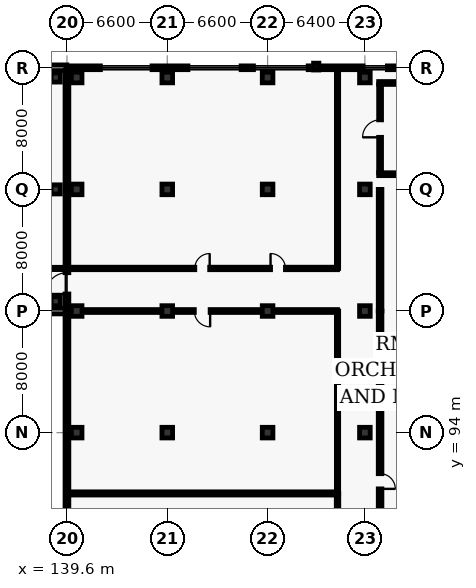
"""IFC4 building model, lengths in metres.
Left out: names, types, materials, properties, quantities, classifications, styles, units other than length and angle.
Written with IfcOpenShell. Run it as: python <this file> out.ifc"""

import sys

from ifc_helpers import new_model, si_unit, direction, frame, frame_2d, origin, origin_2d, place, context, subcontext, project, spatial, rectangle, extrude, element, fill, save


model = new_model("IFC4")
c1 = context("Model", 3, precision=1e-05, world=origin(), true_north=direction((0.0, 1.0)))
c2 = subcontext(c1, "Body", "Model", "MODEL_VIEW")
j1 = project(units=[si_unit("LENGTHUNIT", "METRE"), si_unit("PLANEANGLEUNIT", "RADIAN")], contexts=[c1])
p1 = place(None, origin())
s1 = spatial("IfcSite", under=j1, at=p1, CompositionType="ELEMENT")
p2 = place(p1, origin())
s2 = spatial("IfcBuilding", under=s1, at=p2, CompositionType="ELEMENT")
p3 = place(p2, frame((0.0, 0.0, 10.2)))
s3 = spatial("IfcBuildingStorey", under=s2, at=p3, CompositionType="ELEMENT", Elevation=10.2)
for number, where, z_axis, x_axis in (
    (1, (138.86, 102.64, 0.0), (0.0, 0.0, 1.0), (1.0, 0.0, 0.0)),
    (2, (138.86, 110.0, 0.0), (0.0, 0.0, 1.0), (1.0, 0.0, 0.0)),
    (3, (138.86, 117.36, 0.0), (0.0, 0.0, 1.0), (1.0, 0.0, 0.0)),
):
    element("IfcColumn", number, at=place(p3, frame(where, z_axis=z_axis, x_axis=x_axis)), inside=s3, PredefinedType="COLUMN", context=c2, shape_type="SweptSolid", body=[
        extrude(rectangle(XDim=0.6, YDim=0.6, at=origin_2d()), origin(), (0.0, 0.0, 1.0), 5.4),
    ])
for number, where, z_axis, x_axis in (
    (4, (140.24, 94.0, 0.0), (0.0, 0.0, 1.0), (1.0, 0.0, 0.0)),
    (5, (140.24, 102.0, 0.0), (0.0, 0.0, 1.0), (1.0, 0.0, 0.0)),
    (6, (140.24, 110.0, 0.0), (0.0, 0.0, 1.0), (1.0, 0.0, 0.0)),
    (7, (140.24, 117.36, 0.0), (0.0, 0.0, 1.0), (1.0, 0.0, 0.0)),
    (8, (146.2, 94.0, 0.0), (0.0, 0.0, 1.0), (1.0, 0.0, 0.0)),
    (9, (146.2, 102.0, 0.0), (0.0, 0.0, 1.0), (1.0, 0.0, 0.0)),
    (10, (146.2, 110.0, 0.0), (0.0, 0.0, 1.0), (1.0, 0.0, 0.0)),
    (11, (146.2, 117.36, 0.0), (0.0, 0.0, 1.0), (1.0, 0.0, 0.0)),
    (12, (152.8, 94.0, 0.0), (0.0, 0.0, 1.0), (1.0, 0.0, 0.0)),
    (13, (152.8, 102.0, 0.0), (0.0, 0.0, 1.0), (1.0, 0.0, 0.0)),
    (14, (152.8, 110.0, 0.0), (0.0, 0.0, 1.0), (1.0, 0.0, 0.0)),
    (15, (152.8, 117.36, 0.0), (0.0, 0.0, 1.0), (1.0, 0.0, 0.0)),
    (16, (159.2, 94.0, 0.0), (0.0, 0.0, 1.0), (1.0, 0.0, 0.0)),
    (17, (159.2, 102.0, 0.0), (0.0, 0.0, 1.0), (1.0, 0.0, 0.0)),
    (18, (159.2, 110.0, 0.0), (0.0, 0.0, 1.0), (1.0, 0.0, 0.0)),
    (19, (159.2, 117.36, 0.0), (0.0, 0.0, 1.0), (1.0, 0.0, 0.0)),
):
    element("IfcColumn", number, at=place(p3, frame(where, z_axis=z_axis, x_axis=x_axis)), inside=s3, PredefinedType="COLUMN", context=c2, shape_type="SweptSolid", body=[
        extrude(rectangle(XDim=0.7, YDim=0.7, at=origin_2d()), origin(), (0.0, 0.0, 1.0), 5.4),
    ])
p4 = place(p3, frame((156.0, 118.08, 0.0), z_axis=(0.0, 0.0, 1.0), x_axis=(0.0, 1.0, 0.0)))
e20 = element("IfcColumn", 20, at=p4, inside=s3, PredefinedType="PILASTER", context=c2, shape_type="SweptSolid", body=[
    extrude(rectangle(XDim=0.35, YDim=0.45, at=origin_2d()), origin(), (0.0, 0.0, 1.0), 5.4),
])
p5 = place(p3, frame((94.8, 118.0, 0.0), z_axis=(0.0, 0.0, 1.0), x_axis=(1.0, 0.0, 0.0)))
e21 = element("IfcWall", 21, at=p5, inside=s3, PredefinedType="SOLIDWALL", context=c2, shape_type="SweptSolid", body=[
    extrude(rectangle(XDim=44.795, YDim=0.38, at=frame_2d((22.397, 0.0))), origin(), (0.0, 0.0, 1.0), 5.16),
])
p6 = place(p5, frame((1.45, 0.0, 0.9)))
e22 = element("IfcOpeningElement", 22, at=p6, cuts=e21, PredefinedType="OPENING", context=c2, shape_type="SweptSolid", body=[
    extrude(rectangle(XDim=1.6, YDim=1.65, at=frame_2d((0.8, 0.825))), frame((0.0, 0.2, 0.0), z_axis=(0.0, -1.0, 0.0), x_axis=(1.0, 0.0, 0.0)), (0.0, 0.0, 1.0), 0.4),
])
p7 = place(p5, frame((8.3, 0.0, 0.9)))
e23 = element("IfcOpeningElement", 23, at=p7, cuts=e21, PredefinedType="OPENING", context=c2, shape_type="SweptSolid", body=[
    extrude(rectangle(XDim=3.1, YDim=2.45, at=frame_2d((1.55, 1.225))), frame((0.0, 0.2, 0.0), z_axis=(0.0, -1.0, 0.0), x_axis=(1.0, 0.0, 0.0)), (0.0, 0.0, 1.0), 0.4),
])
p8 = place(p5, frame((15.9, 0.0, 0.9)))
e24 = element("IfcOpeningElement", 24, at=p8, cuts=e21, PredefinedType="OPENING", context=c2, shape_type="SweptSolid", body=[
    extrude(rectangle(XDim=3.2, YDim=2.5, at=frame_2d((1.6, 1.25))), frame((0.0, 0.2, 0.0), z_axis=(0.0, -1.0, 0.0), x_axis=(1.0, 0.0, 0.0)), (0.0, 0.0, 1.0), 0.4),
])
p9 = place(p5, frame((22.75, 0.0, 0.9)))
e25 = element("IfcOpeningElement", 25, at=p9, cuts=e21, PredefinedType="OPENING", context=c2, shape_type="SweptSolid", body=[
    extrude(rectangle(XDim=3.3, YDim=2.5, at=frame_2d((1.65, 1.25))), frame((0.0, 0.2, 0.0), z_axis=(0.0, -1.0, 0.0), x_axis=(1.0, 0.0, 0.0)), (0.0, 0.0, 1.0), 0.4),
])
p10 = place(p5, frame((30.35, 0.0, 0.9)))
e26 = element("IfcOpeningElement", 26, at=p10, cuts=e21, PredefinedType="OPENING", context=c2, shape_type="SweptSolid", body=[
    extrude(rectangle(XDim=3.4, YDim=2.55, at=frame_2d((1.7, 1.275))), frame((0.0, 0.2, 0.0), z_axis=(0.0, -1.0, 0.0), x_axis=(1.0, 0.0, 0.0)), (0.0, 0.0, 1.0), 0.4),
])
p11 = place(p5, frame((36.45, 0.0, 0.9)))
e27 = element("IfcOpeningElement", 27, at=p11, cuts=e21, PredefinedType="OPENING", context=c2, shape_type="SweptSolid", body=[
    extrude(rectangle(XDim=3.5, YDim=2.55, at=frame_2d((1.75, 1.275))), frame((0.0, 0.2, 0.0), z_axis=(0.0, -1.0, 0.0), x_axis=(1.0, 0.0, 0.0)), (0.0, 0.0, 1.0), 0.4),
])
p12 = place(p3, frame((139.5, 102.0, 0.0), z_axis=(0.0, 0.0, 1.0), x_axis=(-1.0, 0.0, 0.0)))
e28 = element("IfcWall", 28, at=p12, inside=s3, PredefinedType="SOLIDWALL", context=c2, shape_type="SweptSolid", body=[
    extrude(rectangle(XDim=44.7, YDim=0.38, at=frame_2d((22.35, 0.0))), origin(), (0.0, 0.0, 1.0), 5.16),
])
p13 = place(p12, frame((2.2, 0.0, 0.9)))
e29 = element("IfcOpeningElement", 29, at=p13, cuts=e28, PredefinedType="OPENING", context=c2, shape_type="SweptSolid", body=[
    extrude(rectangle(XDim=3.6, YDim=2.6, at=frame_2d((1.8, 1.3))), frame((0.0, 0.2, 0.0), z_axis=(0.0, -1.0, 0.0), x_axis=(1.0, 0.0, 0.0)), (0.0, 0.0, 1.0), 0.4),
])
p14 = place(p12, frame((9.05, 0.0, 0.9)))
e30 = element("IfcOpeningElement", 30, at=p14, cuts=e28, PredefinedType="OPENING", context=c2, shape_type="SweptSolid", body=[
    extrude(rectangle(XDim=3.8, YDim=2.6, at=frame_2d((1.9, 1.3))), frame((0.0, 0.2, 0.0), z_axis=(0.0, -1.0, 0.0), x_axis=(1.0, 0.0, 0.0)), (0.0, 0.0, 1.0), 0.4),
])
p15 = place(p12, frame((15.9, 0.0, 0.9)))
e31 = element("IfcOpeningElement", 31, at=p15, cuts=e28, PredefinedType="OPENING", context=c2, shape_type="SweptSolid", body=[
    extrude(rectangle(XDim=1.6, YDim=1.65, at=frame_2d((0.8, 0.825))), frame((0.0, 0.2, 0.0), z_axis=(0.0, -1.0, 0.0), x_axis=(1.0, 0.0, 0.0)), (0.0, 0.0, 1.0), 0.4),
])
p16 = place(p12, frame((22.75, 0.0, 0.9)))
e32 = element("IfcOpeningElement", 32, at=p16, cuts=e28, PredefinedType="OPENING", context=c2, shape_type="SweptSolid", body=[
    extrude(rectangle(XDim=1.8, YDim=1.65, at=frame_2d((0.9, 0.825))), frame((0.0, 0.2, 0.0), z_axis=(0.0, -1.0, 0.0), x_axis=(1.0, 0.0, 0.0)), (0.0, 0.0, 1.0), 0.4),
])
p17 = place(p12, frame((29.6, 0.0, 0.9)))
e33 = element("IfcOpeningElement", 33, at=p17, cuts=e28, PredefinedType="OPENING", context=c2, shape_type="SweptSolid", body=[
    extrude(rectangle(XDim=2.0, YDim=1.7, at=frame_2d((1.0, 0.85))), frame((0.0, 0.2, 0.0), z_axis=(0.0, -1.0, 0.0), x_axis=(1.0, 0.0, 0.0)), (0.0, 0.0, 1.0), 0.4),
])
p18 = place(p12, frame((36.45, 0.0, 0.9)))
e34 = element("IfcOpeningElement", 34, at=p18, cuts=e28, PredefinedType="OPENING", context=c2, shape_type="SweptSolid", body=[
    extrude(rectangle(XDim=2.2, YDim=1.7, at=frame_2d((1.1, 0.85))), frame((0.0, 0.2, 0.0), z_axis=(0.0, -1.0, 0.0), x_axis=(1.0, 0.0, 0.0)), (0.0, 0.0, 1.0), 0.4),
])
p19 = place(p3, frame((139.6, 118.0, 0.0), z_axis=(0.0, 0.0, 1.0), x_axis=(1.0, 0.0, 0.0)))
e35 = element("IfcWall", 35, at=p19, inside=s3, PredefinedType="SOLIDWALL", context=c2, shape_type="SweptSolid", body=[
    extrude(rectangle(XDim=32.4, YDim=0.25, at=frame_2d((16.2, 0.0))), origin(), (0.0, 0.0, 1.0), 5.16),
])
p20 = place(p19, frame((2.2, 0.0, 0.9)))
e36 = element("IfcOpeningElement", 36, at=p20, cuts=e35, PredefinedType="OPENING", context=c2, shape_type="SweptSolid", body=[
    extrude(rectangle(XDim=3.4, YDim=2.55, at=frame_2d((1.7, 1.275))), frame((0.0, 0.135, 0.0), z_axis=(0.0, -1.0, 0.0), x_axis=(1.0, 0.0, 0.0)), (0.0, 0.0, 1.0), 0.27),
])
p21 = place(p19, frame((7.96, 0.0, 0.9)))
e37 = element("IfcOpeningElement", 37, at=p21, cuts=e35, PredefinedType="OPENING", context=c2, shape_type="SweptSolid", body=[
    extrude(rectangle(XDim=3.5, YDim=2.55, at=frame_2d((1.75, 1.275))), frame((0.0, 0.135, 0.0), z_axis=(0.0, -1.0, 0.0), x_axis=(1.0, 0.0, 0.0)), (0.0, 0.0, 1.0), 0.27),
])
p22 = place(p19, frame((12.27, 0.0, 0.9)))
e38 = element("IfcOpeningElement", 38, at=p22, cuts=e35, PredefinedType="OPENING", context=c2, shape_type="SweptSolid", body=[
    extrude(rectangle(XDim=3.6, YDim=2.6, at=frame_2d((1.8, 1.3))), frame((0.0, 0.135, 0.0), z_axis=(0.0, -1.0, 0.0), x_axis=(1.0, 0.0, 0.0)), (0.0, 0.0, 1.0), 0.27),
])
p23 = place(p19, frame((19.48, 0.0, 0.9)))
e39 = element("IfcOpeningElement", 39, at=p23, cuts=e35, PredefinedType="OPENING", context=c2, shape_type="SweptSolid", body=[
    extrude(rectangle(XDim=1.6, YDim=1.65, at=frame_2d((0.8, 0.825))), frame((0.0, 0.135, 0.0), z_axis=(0.0, -1.0, 0.0), x_axis=(1.0, 0.0, 0.0)), (0.0, 0.0, 1.0), 0.27),
])
p24 = place(p3, frame((139.6, 71.74, 0.0), z_axis=(0.0, 0.0, 1.0), x_axis=(0.0, 1.0, 0.0)))
e40 = element("IfcWall", 40, at=p24, inside=s3, PredefinedType="SOLIDWALL", context=c2, shape_type="SweptSolid", body=[
    extrude(rectangle(XDim=46.12, YDim=0.25, at=frame_2d((23.06, 0.0))), origin(), (0.0, 0.0, 1.0), 4.31),
])
p25 = place(p24, frame((31.38, 0.0, 0.0)))
e41 = element("IfcOpeningElement", 41, at=p25, cuts=e40, PredefinedType="OPENING", context=c2, shape_type="SweptSolid", body=[
    extrude(rectangle(XDim=1.4, YDim=2.25, at=frame_2d((0.7, 1.125))), frame((0.0, 0.135, 0.0), z_axis=(0.0, -1.0, 0.0), x_axis=(1.0, 0.0, 0.0)), (0.0, 0.0, 1.0), 0.27),
])
p26 = place(p3, frame((160.105, 111.0, 0.0), z_axis=(0.0, 0.0, 1.0), x_axis=(1.0, 0.0, 0.0)))
e42 = element("IfcWall", 42, at=p26, inside=s3, PredefinedType="PARTITIONING", context=c2, shape_type="SweptSolid", body=[
    extrude(rectangle(XDim=4.495, YDim=0.19, at=frame_2d((2.248, 0.0))), origin(), (0.0, 0.0, 1.0), 5.16),
])
p27 = place(p3, frame((160.105, 117.0, 0.0), z_axis=(0.0, 0.0, 1.0), x_axis=(1.0, 0.0, 0.0)))
e43 = element("IfcWall", 43, at=p27, inside=s3, PredefinedType="PARTITIONING", context=c2, shape_type="SweptSolid", body=[
    extrude(rectangle(XDim=4.143, YDim=0.19, at=frame_2d((2.072, 0.0))), origin(), (0.0, 0.0, 1.0), 4.51),
])
p28 = place(p3, frame((160.2, 111.095, 0.0), z_axis=(0.0, 0.0, 1.0), x_axis=(0.0, 1.0, 0.0)))
e44 = element("IfcWall", 44, at=p28, inside=s3, PredefinedType="PARTITIONING", context=c2, shape_type="SweptSolid", body=[
    extrude(rectangle(XDim=5.81, YDim=0.19, at=frame_2d((2.905, 0.0))), origin(), (0.0, 0.0, 1.0), 5.16),
])
p29 = place(p28, frame((2.33, 0.0, 0.0)))
e45 = element("IfcOpeningElement", 45, at=p29, cuts=e44, PredefinedType="OPENING", context=c2, shape_type="SweptSolid", body=[
    extrude(rectangle(XDim=1.15, YDim=2.2, at=frame_2d((0.575, 1.1))), frame((0.0, 0.105, 0.0), z_axis=(0.0, -1.0, 0.0), x_axis=(1.0, 0.0, 0.0)), (0.0, 0.0, 1.0), 0.21),
])
p30 = place(p3, frame((124.8, 104.8, 0.0), z_axis=(0.0, 0.0, 1.0), x_axis=(1.0, 0.0, 0.0)))
e46 = element("IfcWall", 46, at=p30, inside=s3, PredefinedType="PARTITIONING", context=c2, shape_type="SweptSolid", body=[
    extrude(rectangle(XDim=14.7, YDim=0.15, at=frame_2d((7.35, 0.0))), origin(), (0.0, 0.0, 1.0), 5.16),
])
p31 = place(p30, frame((6.5, 0.0, 0.0)))
e47 = element("IfcOpeningElement", 47, at=p31, cuts=e46, PredefinedType="OPENING", context=c2, shape_type="SweptSolid", body=[
    extrude(rectangle(XDim=1.7, YDim=2.3, at=frame_2d((0.85, 1.15))), frame((0.0, 0.085, 0.0), z_axis=(0.0, -1.0, 0.0), x_axis=(1.0, 0.0, 0.0)), (0.0, 0.0, 1.0), 0.17),
])
p32 = place(p3, frame((157.4, 102.0, 0.0), z_axis=(0.0, 0.0, 1.0), x_axis=(-1.0, 0.0, 0.0)))
e48 = element("IfcWall", 48, at=p32, inside=s3, PredefinedType="PARTITIONING", context=c2, shape_type="SweptSolid", body=[
    extrude(rectangle(XDim=17.8, YDim=0.19, at=frame_2d((8.9, 0.0))), origin(), (0.0, 0.0, 1.0), 4.51),
])
p33 = place(p32, frame((8.38, 0.0, 0.0)))
e49 = element("IfcOpeningElement", 49, at=p33, cuts=e48, PredefinedType="OPENING", context=c2, shape_type="SweptSolid", body=[
    extrude(rectangle(XDim=1.04, YDim=2.2, at=frame_2d((0.52, 1.1))), frame((0.0, 0.105, 0.0), z_axis=(0.0, -1.0, 0.0), x_axis=(1.0, 0.0, 0.0)), (0.0, 0.0, 1.0), 0.21),
])
p34 = place(p3, frame((139.6, 104.8, 0.0), z_axis=(0.0, 0.0, 1.0), x_axis=(1.0, 0.0, 0.0)))
e50 = element("IfcWall", 50, at=p34, inside=s3, PredefinedType="PARTITIONING", context=c2, shape_type="SweptSolid", body=[
    extrude(rectangle(XDim=17.8, YDim=0.165, at=frame_2d((8.9, 0.0))), origin(), (0.0, 0.0, 1.0), 5.16),
])
p35 = place(p34, frame((8.41, 0.0, 0.0)))
e51 = element("IfcOpeningElement", 51, at=p35, cuts=e50, PredefinedType="OPENING", context=c2, shape_type="SweptSolid", body=[
    extrude(rectangle(XDim=0.98, YDim=2.1, at=frame_2d((0.49, 1.05))), frame((0.0, 0.093, 0.0), z_axis=(0.0, -1.0, 0.0), x_axis=(1.0, 0.0, 0.0)), (0.0, 0.0, 1.0), 0.185),
])
p36 = place(p34, frame((13.394, 0.0, 0.0)))
e52 = element("IfcOpeningElement", 52, at=p36, cuts=e50, PredefinedType="OPENING", context=c2, shape_type="SweptSolid", body=[
    extrude(rectangle(XDim=0.98, YDim=2.1, at=frame_2d((0.49, 1.05))), frame((0.0, 0.093, 0.0), z_axis=(0.0, -1.0, 0.0), x_axis=(1.0, 0.0, 0.0)), (0.0, 0.0, 1.0), 0.185),
])
p37 = place(p3, frame((157.4, 104.8, 0.0), z_axis=(0.0, 0.0, 1.0), x_axis=(0.0, 1.0, 0.0)))
e53 = element("IfcWall", 53, at=p37, inside=s3, PredefinedType="PARTITIONING", context=c2, shape_type="SweptSolid", body=[
    extrude(rectangle(XDim=13.2, YDim=0.15, at=frame_2d((6.6, 0.0))), origin(), (0.0, 0.0, 1.0), 5.16),
])
p38 = place(p3, frame((160.2, 110.0, 0.0), z_axis=(0.0, 0.0, 1.0), x_axis=(0.0, -1.0, 0.0)))
e54 = element("IfcWall", 54, at=p38, inside=s3, PredefinedType="PARTITIONING", context=c2, shape_type="SweptSolid", body=[
    extrude(rectangle(XDim=8.0, YDim=0.24, at=frame_2d((4.0, 0.0))), origin(), (0.0, 0.0, 1.0), 5.16),
])
p39 = place(p3, frame((157.4, 74.6, 0.0), z_axis=(0.0, 0.0, 1.0), x_axis=(0.0, 1.0, 0.0)))
e55 = element("IfcWall", 55, at=p39, inside=s3, PredefinedType="PARTITIONING", context=c2, shape_type="SweptSolid", body=[
    extrude(rectangle(XDim=15.4, YDim=0.165, at=frame_2d((7.7, 0.0))), origin(), (0.0, 0.0, 1.0), 5.16),
])
p40 = place(p39, frame((7.23, 0.0, 0.0)))
e56 = element("IfcOpeningElement", 56, at=p40, cuts=e55, PredefinedType="OPENING", context=c2, shape_type="SweptSolid", body=[
    extrude(rectangle(XDim=0.94, YDim=2.15, at=frame_2d((0.47, 1.075))), frame((0.0, 0.093, 0.0), z_axis=(0.0, -1.0, 0.0), x_axis=(1.0, 0.0, 0.0)), (0.0, 0.0, 1.0), 0.185),
])
p41 = place(p39, frame((11.542, 0.0, 0.0)))
e57 = element("IfcOpeningElement", 57, at=p41, cuts=e55, PredefinedType="OPENING", context=c2, shape_type="SweptSolid", body=[
    extrude(rectangle(XDim=0.94, YDim=2.15, at=frame_2d((0.47, 1.075))), frame((0.0, 0.093, 0.0), z_axis=(0.0, -1.0, 0.0), x_axis=(1.0, 0.0, 0.0)), (0.0, 0.0, 1.0), 0.185),
])
p42 = place(p3, frame((157.4, 90.0, 0.0), z_axis=(0.0, 0.0, 1.0), x_axis=(0.0, 1.0, 0.0)))
e58 = element("IfcWall", 58, at=p42, inside=s3, PredefinedType="PARTITIONING", context=c2, shape_type="SweptSolid", body=[
    extrude(rectangle(XDim=12.0, YDim=0.15, at=frame_2d((6.0, 0.0))), origin(), (0.0, 0.0, 1.0), 5.16),
])
p43 = place(p3, frame((160.2, 102.0, 0.0), z_axis=(0.0, 0.0, 1.0), x_axis=(0.0, -1.0, 0.0)))
e59 = element("IfcWall", 59, at=p43, inside=s3, PredefinedType="PARTITIONING", context=c2, shape_type="SweptSolid", body=[
    extrude(rectangle(XDim=22.4, YDim=0.24, at=frame_2d((11.2, 0.0))), origin(), (0.0, 0.0, 1.0), 5.16),
])
p44 = place(p43, frame((10.7, 0.0, 0.0)))
e60 = element("IfcOpeningElement", 60, at=p44, cuts=e59, PredefinedType="OPENING", context=c2, shape_type="SweptSolid", body=[
    extrude(rectangle(XDim=1.0, YDim=2.1, at=frame_2d((0.5, 1.05))), frame((0.0, 0.13, 0.0), z_axis=(0.0, -1.0, 0.0), x_axis=(1.0, 0.0, 0.0)), (0.0, 0.0, 1.0), 0.26),
])
p45 = place(p43, frame((16.772, 0.0, 0.0)))
e61 = element("IfcOpeningElement", 61, at=p45, cuts=e59, PredefinedType="OPENING", context=c2, shape_type="SweptSolid", body=[
    extrude(rectangle(XDim=1.4, YDim=2.25, at=frame_2d((0.7, 1.125))), frame((0.0, 0.13, 0.0), z_axis=(0.0, -1.0, 0.0), x_axis=(1.0, 0.0, 0.0)), (0.0, 0.0, 1.0), 0.26),
])
p46 = place(p3, frame((139.6, 90.0, 0.0), z_axis=(0.0, 0.0, 1.0), x_axis=(1.0, 0.0, 0.0)))
e62 = element("IfcWall", 62, at=p46, inside=s3, PredefinedType="PARTITIONING", context=c2, shape_type="SweptSolid", body=[
    extrude(rectangle(XDim=17.8, YDim=0.21, at=frame_2d((8.9, 0.0))), origin(), (0.0, 0.0, 1.0), 5.16),
])
p47 = place(p20, origin())
e63 = element("IfcWindow", 63, at=p47, inside=s3, PartitioningType="SINGLE_PANEL", PredefinedType="WINDOW", context=c2, shape_type="SweptSolid", body=[
    extrude(rectangle(XDim=3.4, YDim=2.55, at=frame_2d((1.7, 1.275))), frame((0.0, 0.03, 0.0), z_axis=(0.0, -1.0, 0.0), x_axis=(1.0, 0.0, 0.0)), (0.0, 0.0, 1.0), 0.06),
])
fill(e36, e63)
p48 = place(p21, origin())
e64 = element("IfcWindow", 64, at=p48, inside=s3, PartitioningType="SINGLE_PANEL", PredefinedType="WINDOW", context=c2, shape_type="SweptSolid", body=[
    extrude(rectangle(XDim=3.5, YDim=2.55, at=frame_2d((1.75, 1.275))), frame((0.0, 0.03, 0.0), z_axis=(0.0, -1.0, 0.0), x_axis=(1.0, 0.0, 0.0)), (0.0, 0.0, 1.0), 0.06),
])
fill(e37, e64)
p49 = place(p22, origin())
e65 = element("IfcWindow", 65, at=p49, inside=s3, PartitioningType="SINGLE_PANEL", PredefinedType="WINDOW", context=c2, shape_type="SweptSolid", body=[
    extrude(rectangle(XDim=3.6, YDim=2.6, at=frame_2d((1.8, 1.3))), frame((0.0, 0.03, 0.0), z_axis=(0.0, -1.0, 0.0), x_axis=(1.0, 0.0, 0.0)), (0.0, 0.0, 1.0), 0.06),
])
fill(e38, e65)
p50 = place(p23, origin())
e66 = element("IfcWindow", 66, at=p50, inside=s3, PartitioningType="SINGLE_PANEL", PredefinedType="WINDOW", context=c2, shape_type="SweptSolid", body=[
    extrude(rectangle(XDim=1.6, YDim=1.65, at=frame_2d((0.8, 0.825))), frame((0.0, 0.03, 0.0), z_axis=(0.0, -1.0, 0.0), x_axis=(1.0, 0.0, 0.0)), (0.0, 0.0, 1.0), 0.06),
])
fill(e39, e66)
p51 = place(p29, origin())
e67 = element("IfcDoor", 67, at=p51, inside=s3, OperationType="SINGLE_SWING_LEFT", PredefinedType="DOOR", context=c2, shape_type="SweptSolid", body=[
    extrude(rectangle(XDim=1.15, YDim=2.2, at=frame_2d((0.575, 1.1))), frame((0.0, 0.025, 0.0), z_axis=(0.0, -1.0, 0.0), x_axis=(1.0, 0.0, 0.0)), (0.0, 0.0, 1.0), 0.05),
])
fill(e45, e67)
p52 = place(p25, origin())
e68 = element("IfcDoor", 68, at=p52, inside=s3, OperationType="SINGLE_SWING_LEFT", PredefinedType="DOOR", context=c2, shape_type="SweptSolid", body=[
    extrude(rectangle(XDim=1.4, YDim=2.25, at=frame_2d((0.7, 1.125))), frame((0.0, 0.025, 0.0), z_axis=(0.0, -1.0, 0.0), x_axis=(1.0, 0.0, 0.0)), (0.0, 0.0, 1.0), 0.05),
])
fill(e41, e68)
p53 = place(p33, origin())
e69 = element("IfcDoor", 69, at=p53, inside=s3, OperationType="SINGLE_SWING_LEFT", PredefinedType="DOOR", context=c2, shape_type="SweptSolid", body=[
    extrude(rectangle(XDim=1.04, YDim=2.2, at=frame_2d((0.52, 1.1))), frame((0.0, 0.025, 0.0), z_axis=(0.0, -1.0, 0.0), x_axis=(1.0, 0.0, 0.0)), (0.0, 0.0, 1.0), 0.05),
])
fill(e49, e69)
p54 = place(p35, origin())
e70 = element("IfcDoor", 70, at=p54, inside=s3, OperationType="SINGLE_SWING_RIGHT", PredefinedType="DOOR", context=c2, shape_type="SweptSolid", body=[
    extrude(rectangle(XDim=0.98, YDim=2.1, at=frame_2d((0.49, 1.05))), frame((0.0, 0.025, 0.0), z_axis=(0.0, -1.0, 0.0), x_axis=(1.0, 0.0, 0.0)), (0.0, 0.0, 1.0), 0.05),
])
fill(e51, e70)
p55 = place(p36, origin())
e71 = element("IfcDoor", 71, at=p55, inside=s3, OperationType="SINGLE_SWING_LEFT", PredefinedType="DOOR", context=c2, shape_type="SweptSolid", body=[
    extrude(rectangle(XDim=0.98, YDim=2.1, at=frame_2d((0.49, 1.05))), frame((0.0, 0.025, 0.0), z_axis=(0.0, -1.0, 0.0), x_axis=(1.0, 0.0, 0.0)), (0.0, 0.0, 1.0), 0.05),
])
fill(e52, e71)
p56 = place(p44, origin())
e72 = element("IfcDoor", 72, at=p56, inside=s3, OperationType="SINGLE_SWING_RIGHT", PredefinedType="DOOR", context=c2, shape_type="SweptSolid", body=[
    extrude(rectangle(XDim=1.0, YDim=2.1, at=frame_2d((0.5, 1.05))), frame((0.0, 0.025, 0.0), z_axis=(0.0, -1.0, 0.0), x_axis=(1.0, 0.0, 0.0)), (0.0, 0.0, 1.0), 0.05),
])
fill(e60, e72)
save(model, sys.argv[1])
